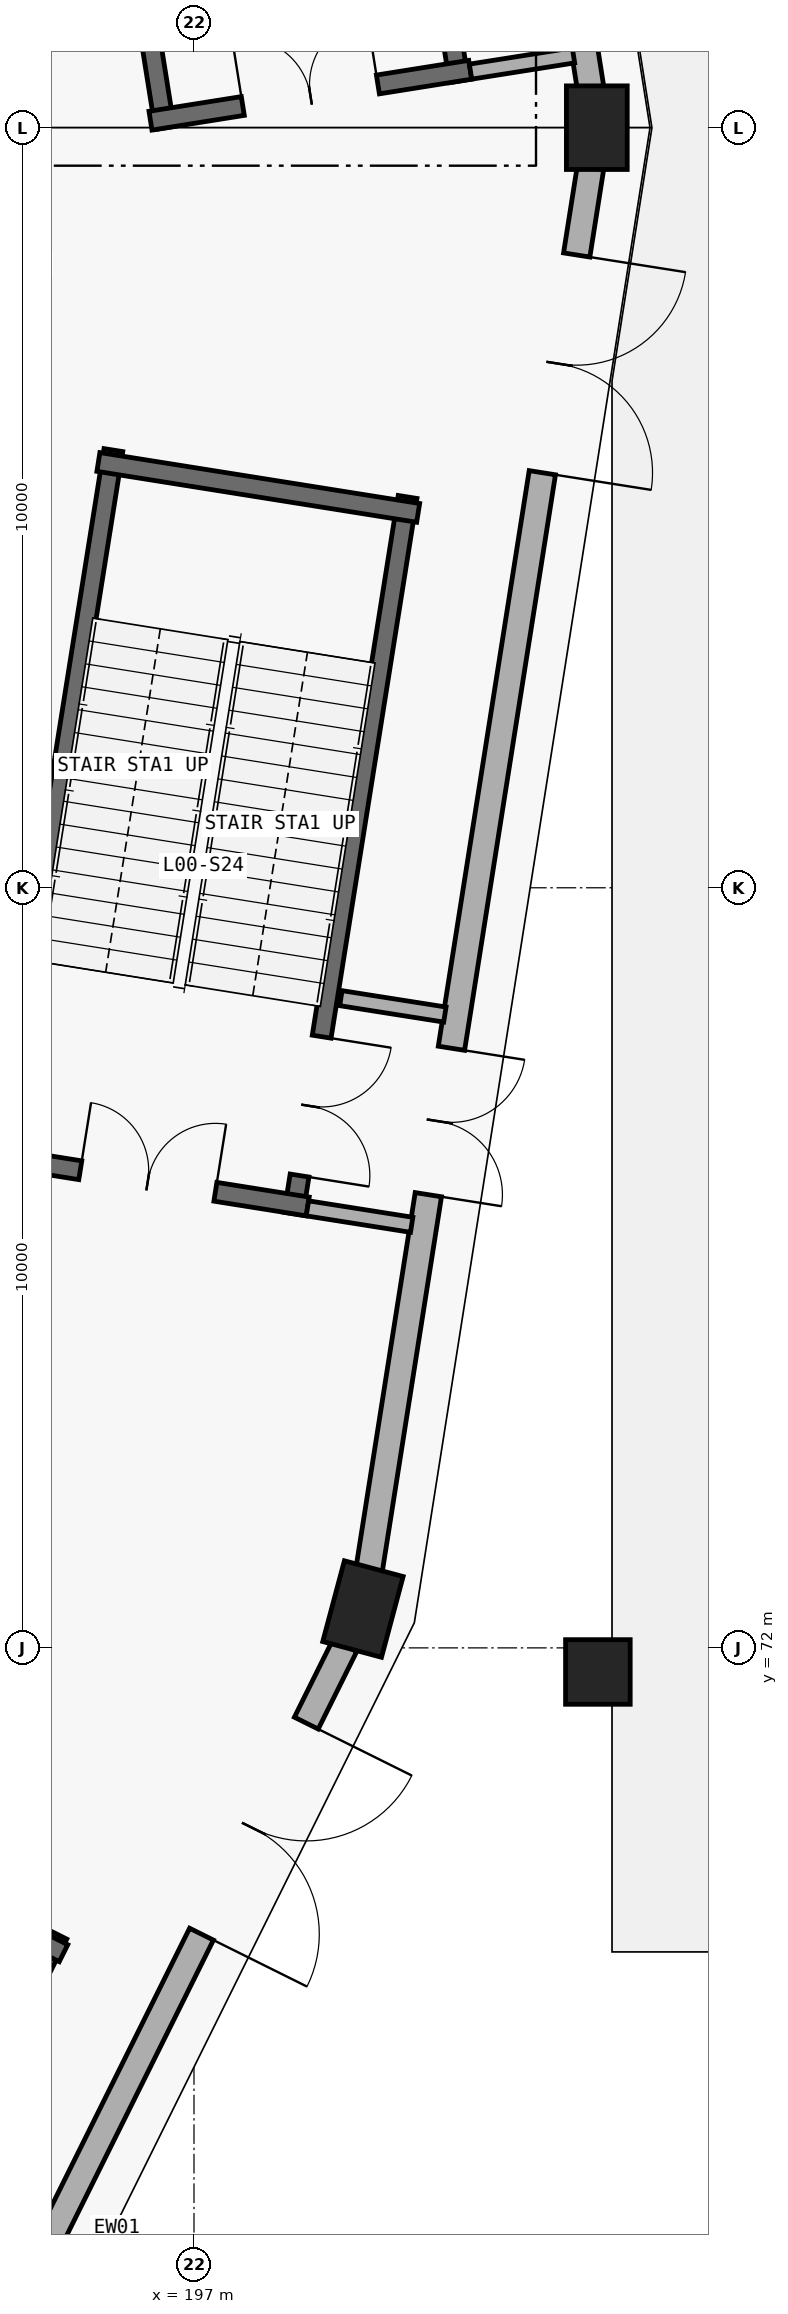
"""IFC4 building model, lengths in metres.
Left out: names, types, materials, properties, quantities, classifications, styles, units other than length and angle.
Written with IfcOpenShell. Run it as: python <this file> out.ifc"""

import sys

from ifc_helpers import new_model, si_unit, direction, frame, frame_2d, origin, origin_2d, place, context, subcontext, project, spatial, rectangle, circle, extrude, element, fill, save


model = new_model("IFC4")
c1 = context("Model", 3, precision=1e-05, world=origin(), true_north=direction((0.0, 1.0)))
c2 = subcontext(c1, "Body", "Model", "MODEL_VIEW")
j1 = project(units=[si_unit("LENGTHUNIT", "METRE"), si_unit("PLANEANGLEUNIT", "RADIAN")], contexts=[c1])
p1 = place(None, origin())
s1 = spatial("IfcSite", under=j1, at=p1, CompositionType="ELEMENT")
p2 = place(p1, origin())
s2 = spatial("IfcBuilding", under=s1, at=p2, CompositionType="ELEMENT")
p3 = place(p2, origin())
s3 = spatial("IfcBuildingStorey", under=s2, at=p3, CompositionType="ELEMENT", Elevation=0.0)
for number, where, z_axis, x_axis in (
    (1, (202.3, 92.0, 0.0), (0.0, 0.0, 1.0), (1.0, 0.0, 0.0)),
    (2, (199.223, 72.511, 0.0), (0.0, 0.0, 1.0), (-0.966, 0.259, 0.0)),
):
    element("IfcColumn", number, at=place(p3, frame(where, z_axis=z_axis, x_axis=x_axis)), inside=s3, PredefinedType="COLUMN", context=c2, shape_type="SweptSolid", body=[
        extrude(rectangle(XDim=0.8, YDim=1.1, at=origin_2d()), origin(), (0.0, 0.0, 1.0), 5.4),
    ])
p4 = place(p3, frame((202.314, 71.683, 0.0), z_axis=(0.0, 0.0, 1.0), x_axis=(1.0, 0.0, 0.0)))
e3 = element("IfcColumn", 3, at=p4, inside=s3, PredefinedType="COLUMN", context=c2, shape_type="SweptSolid", body=[
    extrude(circle(Radius=0.425, at=origin_2d()), origin(), (0.0, 0.0, 1.0), 5.4),
])
p5 = place(p3, frame((199.305, 110.967, 0.0), z_axis=(0.0, 0.0, 1.0), x_axis=(0.155972645656, -0.987761374932, 0.0)))
e4 = element("IfcWall", 4, at=p5, inside=s3, PredefinedType="STANDARD", context=c2, shape_type="SweptSolid", body=[
    extrude(rectangle(XDim=18.671, YDim=0.35, at=frame_2d((9.335, 0.0))), origin(), (0.0, 0.0, 1.0), 4.165),
])
p6 = place(p5, frame((15.84, 0.0, 0.0)))
e5 = element("IfcOpeningElement", 5, at=p6, cuts=e4, PredefinedType="OPENING", context=c2, shape_type="SweptSolid", body=[
    extrude(rectangle(XDim=1.95, YDim=2.25, at=frame_2d((0.975, 1.125))), frame((0.0, 0.185, 0.0), z_axis=(0.0, -1.0, 0.0), x_axis=(1.0, 0.0, 0.0)), (0.0, 0.0, 1.0), 0.37),
])
p7 = place(p5, frame((2.681, 0.0, 0.0)))
e6 = element("IfcOpeningElement", 6, at=p7, cuts=e4, PredefinedType="OPENING", context=c2, shape_type="SweptSolid", body=[
    extrude(rectangle(XDim=3.6, YDim=2.7, at=frame_2d((1.8, 1.35))), frame((0.0, 0.185, 0.0), z_axis=(0.0, -1.0, 0.0), x_axis=(1.0, 0.0, 0.0)), (0.0, 0.0, 1.0), 0.37),
])
p8 = place(p3, frame((198.985, 72.031, 0.0), z_axis=(0.0, 0.0, 1.0), x_axis=(-0.444884558919, -0.895587923788, 0.0)))
e7 = element("IfcWall", 7, at=p8, inside=s3, PredefinedType="STANDARD", context=c2, shape_type="SweptSolid", body=[
    extrude(rectangle(XDim=19.216, YDim=0.35, at=frame_2d((9.608, 0.0))), origin(), (0.0, 0.0, 1.0), 4.165),
])
p9 = place(p8, frame((12.161, 0.0, 0.0)))
e8 = element("IfcOpeningElement", 8, at=p9, cuts=e7, PredefinedType="OPENING", context=c2, shape_type="SweptSolid", body=[
    extrude(rectangle(XDim=1.95, YDim=2.25, at=frame_2d((0.975, 1.125))), frame((0.0, 0.185, 0.0), z_axis=(0.0, -1.0, 0.0), x_axis=(1.0, 0.0, 0.0)), (0.0, 0.0, 1.0), 0.37),
])
p10 = place(p8, frame((1.14, 0.0, 0.0)))
e9 = element("IfcOpeningElement", 9, at=p10, cuts=e7, PredefinedType="OPENING", context=c2, shape_type="SweptSolid", body=[
    extrude(rectangle(XDim=3.1, YDim=2.58, at=frame_2d((1.55, 1.29))), frame((0.0, 0.185, 0.0), z_axis=(0.0, -1.0, 0.0), x_axis=(1.0, 0.0, 0.0)), (0.0, 0.0, 1.0), 0.37),
])
p11 = place(p3, frame((202.217, 91.475, 0.0), z_axis=(0.0, 0.0, 1.0), x_axis=(-0.155972645656, -0.987761374932, 0.0)))
e10 = element("IfcWall", 10, at=p11, inside=s3, PredefinedType="STANDARD", context=c2, shape_type="SweptSolid", body=[
    extrude(rectangle(XDim=18.671, YDim=0.35, at=frame_2d((9.335, 0.0))), origin(), (0.0, 0.0, 1.0), 4.165),
])
p12 = place(p11, frame((11.73, 0.0, 0.0)))
e11 = element("IfcOpeningElement", 11, at=p12, cuts=e10, PredefinedType="OPENING", context=c2, shape_type="SweptSolid", body=[
    extrude(rectangle(XDim=1.95, YDim=2.25, at=frame_2d((0.975, 1.125))), frame((0.0, 0.185, 0.0), z_axis=(0.0, -1.0, 0.0), x_axis=(1.0, 0.0, 0.0)), (0.0, 0.0, 1.0), 0.37),
])
p13 = place(p11, frame((1.164, 0.0, 0.0)))
e12 = element("IfcOpeningElement", 12, at=p13, cuts=e10, PredefinedType="OPENING", context=c2, shape_type="SweptSolid", body=[
    extrude(rectangle(XDim=2.9, YDim=2.52, at=frame_2d((1.45, 1.26))), frame((0.0, 0.185, 0.0), z_axis=(0.0, -1.0, 0.0), x_axis=(1.0, 0.0, 0.0)), (0.0, 0.0, 1.0), 0.37),
])
p14 = place(p3, frame((198.984, 102.043, 0.0), z_axis=(0.0, 0.0, 1.0), x_axis=(0.157268610044, -0.987555863886, 0.0)))
e13 = element("IfcWall", 13, at=p14, inside=s3, PredefinedType="SHEAR", context=c2, shape_type="SweptSolid", body=[
    extrude(rectangle(XDim=9.55, YDim=0.25, at=frame_2d((4.775, 0.0))), origin(), (0.0, 0.0, 1.0), 5.1),
])
p15 = place(p14, frame((7.19, 0.0, 0.0)))
e14 = element("IfcOpeningElement", 14, at=p15, cuts=e13, PredefinedType="OPENING", context=c2, shape_type="SweptSolid", body=[
    extrude(rectangle(XDim=1.85, YDim=2.3, at=frame_2d((0.925, 1.15))), frame((0.0, 0.135, 0.0), z_axis=(0.0, -1.0, 0.0), x_axis=(1.0, 0.0, 0.0)), (0.0, 0.0, 1.0), 0.27),
])
p16 = place(p3, frame((195.113, 101.427, 0.0), z_axis=(0.0, 0.0, 1.0), x_axis=(0.157243678356, -0.987559833943, 0.0)))
e15 = element("IfcWall", 15, at=p16, inside=s3, PredefinedType="SHEAR", context=c2, shape_type="SweptSolid", body=[
    extrude(rectangle(XDim=9.55, YDim=0.25, at=frame_2d((4.775, 0.0))), origin(), (0.0, 0.0, 1.0), 5.1),
])
p17 = place(p3, frame((196.427, 92.092, 0.0), z_axis=(0.0, 0.0, 1.0), x_axis=(0.987557660991, 0.157257324847, 0.0)))
e16 = element("IfcWall", 16, at=p17, inside=s3, PredefinedType="SHEAR", context=c2, shape_type="SweptSolid", body=[
    extrude(rectangle(XDim=4.26, YDim=0.25, at=frame_2d((2.13, 0.0))), origin(), (0.0, 0.0, 1.0), 5.1),
])
p18 = place(p17, frame((1.23, 0.0, 0.0)))
e17 = element("IfcOpeningElement", 17, at=p18, cuts=e16, PredefinedType="OPENING", context=c2, shape_type="SweptSolid", body=[
    extrude(rectangle(XDim=1.8, YDim=2.25, at=frame_2d((0.9, 1.125))), frame((0.0, 0.135, 0.0), z_axis=(0.0, -1.0, 0.0), x_axis=(1.0, 0.0, 0.0)), (0.0, 0.0, 1.0), 0.27),
])
p19 = place(p3, frame((195.214, 68.225, 0.0), z_axis=(0.0, 0.0, 1.0), x_axis=(-0.447919041961, -0.894074119885, 0.0)))
e18 = element("IfcWall", 18, at=p19, inside=s3, PredefinedType="SHEAR", context=c2, shape_type="SweptSolid", body=[
    extrude(rectangle(XDim=9.55, YDim=0.25, at=frame_2d((4.775, 0.0))), origin(), (0.0, 0.0, 1.0), 5.1),
])
p20 = place(p19, frame((7.19, 0.0, 0.0)))
e19 = element("IfcOpeningElement", 19, at=p20, cuts=e18, PredefinedType="OPENING", context=c2, shape_type="SweptSolid", body=[
    extrude(rectangle(XDim=1.85, YDim=2.3, at=frame_2d((0.925, 1.15))), frame((0.0, 0.135, 0.0), z_axis=(0.0, -1.0, 0.0), x_axis=(1.0, 0.0, 0.0)), (0.0, 0.0, 1.0), 0.27),
])
p21 = place(p3, frame((195.283, 67.984, 0.0), z_axis=(0.0, 0.0, 1.0), x_axis=(-0.894083048484, 0.447901219481, 0.0)))
e20 = element("IfcWall", 20, at=p21, inside=s3, PredefinedType="SHEAR", context=c2, shape_type="SweptSolid", body=[
    extrude(rectangle(XDim=4.26, YDim=0.25, at=frame_2d((2.13, 0.0))), origin(), (0.0, 0.0, 1.0), 5.1),
])
p22 = place(p3, frame((199.811, 87.142, 0.0), z_axis=(0.0, 0.0, 1.0), x_axis=(-0.157272580499, -0.987555231581, 0.0)))
e21 = element("IfcWall", 21, at=p22, inside=s3, PredefinedType="SHEAR", context=c2, shape_type="SweptSolid", body=[
    extrude(rectangle(XDim=9.55, YDim=0.25, at=frame_2d((4.775, 0.0))), origin(), (0.0, 0.0, 1.0), 5.1),
])
p23 = place(p22, frame((7.19, 0.0, 0.0)))
e22 = element("IfcOpeningElement", 22, at=p23, cuts=e21, PredefinedType="OPENING", context=c2, shape_type="SweptSolid", body=[
    extrude(rectangle(XDim=1.85, YDim=2.3, at=frame_2d((0.925, 1.15))), frame((0.0, 0.135, 0.0), z_axis=(0.0, -1.0, 0.0), x_axis=(1.0, 0.0, 0.0)), (0.0, 0.0, 1.0), 0.27),
])
p24 = place(p3, frame((195.939, 87.758, 0.0), z_axis=(0.0, 0.0, 1.0), x_axis=(-0.157247648214, -0.987559201836, 0.0)))
e23 = element("IfcWall", 23, at=p24, inside=s3, PredefinedType="SHEAR", context=c2, shape_type="SweptSolid", body=[
    extrude(rectangle(XDim=9.55, YDim=0.25, at=frame_2d((4.775, 0.0))), origin(), (0.0, 0.0, 1.0), 5.1),
])
p25 = place(p3, frame((194.289, 78.477, 0.0), z_axis=(0.0, 0.0, 1.0), x_axis=(0.987548759282, -0.157313216355, 0.0)))
e24 = element("IfcWall", 24, at=p25, inside=s3, PredefinedType="SHEAR", context=c2, shape_type="SweptSolid", body=[
    extrude(rectangle(XDim=4.26, YDim=0.25, at=frame_2d((2.13, 0.0))), origin(), (0.0, 0.0, 1.0), 5.1),
])
p26 = place(p25, frame((1.23, 0.0, 0.0)))
e25 = element("IfcOpeningElement", 25, at=p26, cuts=e24, PredefinedType="OPENING", context=c2, shape_type="SweptSolid", body=[
    extrude(rectangle(XDim=1.8, YDim=2.25, at=frame_2d((0.9, 1.125))), frame((0.0, 0.135, 0.0), z_axis=(0.0, -1.0, 0.0), x_axis=(1.0, 0.0, 0.0)), (0.0, 0.0, 1.0), 0.27),
])
p27 = place(p3, frame((199.949, 86.932, 0.0), z_axis=(0.0, 0.0, 1.0), x_axis=(-0.987556243614, 0.157266225551, 0.0)))
e26 = element("IfcWall", 26, at=p27, inside=s3, PredefinedType="SHEAR", context=c2, shape_type="SweptSolid", body=[
    extrude(rectangle(XDim=4.26, YDim=0.25, at=frame_2d((2.13, 0.0))), origin(), (0.0, 0.0, 1.0), 5.1),
])
p28 = place(p3, frame((200.638, 92.737, 0.0), z_axis=(0.0, 0.0, 1.0), x_axis=(0.987762965329, 0.155962573473, 0.0)))
e27 = element("IfcWall", 27, at=p28, inside=s3, PredefinedType="PARTITIONING", context=c2, shape_type="SweptSolid", body=[
    extrude(rectangle(XDim=1.371, YDim=0.2, at=frame_2d((0.686, 0.0))), origin(), (0.0, 0.0, 1.0), 4.165),
])
p29 = place(p3, frame((198.492, 77.782, 0.0), z_axis=(0.0, 0.0, 1.0), x_axis=(0.987768665993, -0.155926464982, 0.0)))
e28 = element("IfcWall", 28, at=p29, inside=s3, PredefinedType="PARTITIONING", context=c2, shape_type="SweptSolid", body=[
    extrude(rectangle(XDim=1.389, YDim=0.2, at=frame_2d((0.694, 0.0))), origin(), (0.0, 0.0, 1.0), 4.165),
])
p30 = place(p3, frame((198.933, 80.548, 0.0), z_axis=(0.0, 0.0, 1.0), x_axis=(0.987817205995, -0.155618660641, 0.0)))
e29 = element("IfcWall", 29, at=p30, inside=s3, PredefinedType="PARTITIONING", context=c2, shape_type="SweptSolid", body=[
    extrude(rectangle(XDim=1.385, YDim=0.2, at=frame_2d((0.693, 0.0))), origin(), (0.0, 0.0, 1.0), 4.165),
])
p31 = place(p10, origin())
e30 = element("IfcDoor", 30, at=p31, inside=s3, OperationType="DOUBLE_DOOR_SINGLE_SWING", PredefinedType="DOOR", context=c2, shape_type="SweptSolid", body=[
    extrude(rectangle(XDim=3.1, YDim=2.58, at=frame_2d((1.55, 1.29))), frame((0.0, 0.025, 0.0), z_axis=(0.0, -1.0, 0.0), x_axis=(1.0, 0.0, 0.0)), (0.0, 0.0, 1.0), 0.05),
])
fill(e9, e30)
p32 = place(p12, origin())
e31 = element("IfcDoor", 31, at=p32, inside=s3, OperationType="DOUBLE_DOOR_SINGLE_SWING", PredefinedType="DOOR", context=c2, shape_type="SweptSolid", body=[
    extrude(rectangle(XDim=1.95, YDim=2.25, at=frame_2d((0.975, 1.125))), frame((0.0, 0.025, 0.0), z_axis=(0.0, -1.0, 0.0), x_axis=(1.0, 0.0, 0.0)), (0.0, 0.0, 1.0), 0.05),
])
fill(e11, e31)
p33 = place(p13, origin())
e32 = element("IfcDoor", 32, at=p33, inside=s3, OperationType="DOUBLE_DOOR_SINGLE_SWING", PredefinedType="DOOR", context=c2, shape_type="SweptSolid", body=[
    extrude(rectangle(XDim=2.9, YDim=2.52, at=frame_2d((1.45, 1.26))), frame((0.0, 0.025, 0.0), z_axis=(0.0, -1.0, 0.0), x_axis=(1.0, 0.0, 0.0)), (0.0, 0.0, 1.0), 0.05),
])
fill(e12, e32)
p34 = place(p18, origin())
e33 = element("IfcDoor", 33, at=p34, inside=s3, OperationType="DOUBLE_DOOR_SINGLE_SWING", PredefinedType="DOOR", context=c2, shape_type="SweptSolid", body=[
    extrude(rectangle(XDim=1.8, YDim=2.25, at=frame_2d((0.9, 1.125))), frame((0.0, 0.025, 0.0), z_axis=(0.0, -1.0, 0.0), x_axis=(1.0, 0.0, 0.0)), (0.0, 0.0, 1.0), 0.05),
])
fill(e17, e33)
p35 = place(p26, origin())
e34 = element("IfcDoor", 34, at=p35, inside=s3, OperationType="DOUBLE_DOOR_SINGLE_SWING", PredefinedType="DOOR", context=c2, shape_type="SweptSolid", body=[
    extrude(rectangle(XDim=1.8, YDim=2.25, at=frame_2d((0.9, 1.125))), frame((0.0, 0.025, 0.0), z_axis=(0.0, -1.0, 0.0), x_axis=(1.0, 0.0, 0.0)), (0.0, 0.0, 1.0), 0.05),
])
fill(e25, e34)
p36 = place(p23, origin())
e35 = element("IfcDoor", 35, at=p36, inside=s3, OperationType="DOUBLE_DOOR_SINGLE_SWING", PredefinedType="DOOR", context=c2, shape_type="SweptSolid", body=[
    extrude(rectangle(XDim=1.85, YDim=2.3, at=frame_2d((0.925, 1.15))), frame((0.0, 0.025, 0.0), z_axis=(0.0, -1.0, 0.0), x_axis=(1.0, 0.0, 0.0)), (0.0, 0.0, 1.0), 0.05),
])
fill(e22, e35)
save(model, sys.argv[1])
